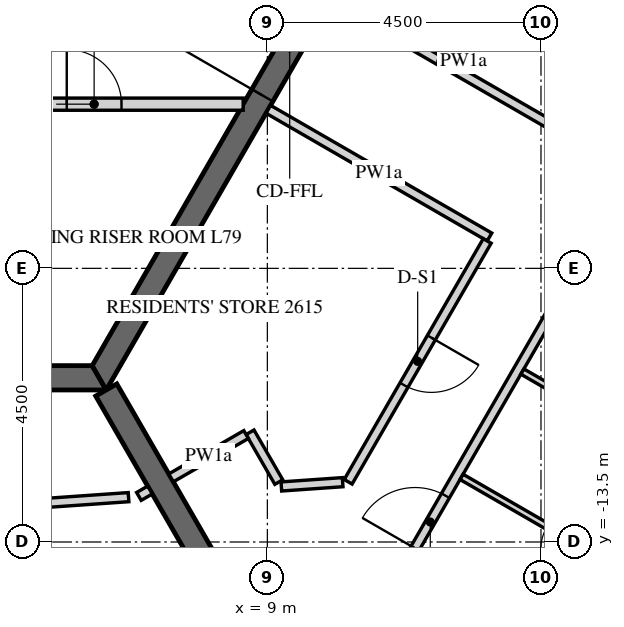
"""IFC4 building model, lengths in metres.
Left out: names, types, materials, properties, quantities, classifications, styles, units other than length and angle.
Written with IfcOpenShell. Run it as: python <this file> out.ifc"""

import sys

from ifc_helpers import new_model, si_unit, direction, frame, frame_2d, origin, place, context, subcontext, project, spatial, polyline, rectangle, outline, extrude, element, fill, save


model = new_model("IFC4")
c1 = context("Model", 3, precision=1e-05, world=origin(), true_north=direction((0.0, 1.0)))
c2 = subcontext(c1, "Body", "Model", "MODEL_VIEW")
j1 = project(units=[si_unit("LENGTHUNIT", "METRE"), si_unit("PLANEANGLEUNIT", "RADIAN")], contexts=[c1])
p1 = place(None, origin())
s1 = spatial("IfcSite", under=j1, at=p1, CompositionType="ELEMENT")
p2 = place(p1, origin())
s2 = spatial("IfcBuilding", under=s1, at=p2, CompositionType="ELEMENT")
p3 = place(p2, frame((0.0, 0.0, 326.4)))
s3 = spatial("IfcBuildingStorey", under=s2, at=p3, CompositionType="ELEMENT", Elevation=326.4)
p4 = place(p3, frame((-6.235, -10.8, -0.15), z_axis=(0.0, 0.0, 1.0), x_axis=(1.0, 0.0, 0.0)))
e1 = element("IfcWall", 1, at=p4, inside=s3, PredefinedType="SHEAR", context=c2, shape_type="SweptSolid", body=[
    extrude(outline(polyline([(-0.115, -0.2), (12.586, -0.2), (12.355, 0.2), (0.115, 0.2), (-0.115, -0.2)])), origin(), (0.0, 0.0, 1.0), 3.9),
])
p5 = place(p3, frame((6.235, -10.8, -0.15), z_axis=(0.0, 0.0, 1.0), x_axis=(0.499996419489, 0.866027470984, 0.0)))
e2 = element("IfcWall", 2, at=p5, inside=s3, PredefinedType="SHEAR", context=c2, shape_type="SweptSolid", body=[
    extrude(outline(polyline([(-0.115, -0.2), (12.586, -0.2), (12.355, 0.2), (0.115, 0.2), (-0.115, -0.2)])), origin(), (0.0, 0.0, 1.0), 3.9),
])
p6 = place(p5, frame((5.364, 0.0, 0.15)))
e3 = element("IfcOpeningElement", 3, at=p6, cuts=e2, PredefinedType="OPENING", context=c2, shape_type="SweptSolid", body=[
    extrude(rectangle(XDim=1.8, YDim=2.4, at=frame_2d((0.9, 1.2))), frame((0.0, 0.21, 0.0), z_axis=(0.0, -1.0, 0.0), x_axis=(1.0, 0.0, 0.0)), (0.0, 0.0, 1.0), 0.42),
])
p7 = place(p3, frame((6.351, -11.0, -0.15), z_axis=(0.0, 0.0, 1.0), x_axis=(0.499998894578, -0.866026041999, 0.0)))
e4 = element("IfcWall", 4, at=p7, inside=s3, PredefinedType="SHEAR", context=c2, shape_type="SweptSolid", body=[
    extrude(rectangle(XDim=15.544, YDim=0.4, at=frame_2d((7.772, 0.0))), origin(), (0.0, 0.0, 1.0), 3.9),
])
p8 = place(p7, frame((6.872, 0.0, 0.15)))
e5 = element("IfcOpeningElement", 5, at=p8, cuts=e4, PredefinedType="OPENING", context=c2, shape_type="SweptSolid", body=[
    extrude(rectangle(XDim=1.8, YDim=2.4, at=frame_2d((0.9, 1.2))), frame((0.0, 0.21, 0.0), z_axis=(0.0, -1.0, 0.0), x_axis=(1.0, 0.0, 0.0)), (0.0, 0.0, 1.0), 0.42),
])
p9 = place(p3, frame((3.7, -6.3, 0.0), z_axis=(0.0, 0.0, 1.0), x_axis=(1.0, 0.0, 0.0)))
e6 = element("IfcWall", 6, at=p9, inside=s3, PredefinedType="PARTITIONING", context=c2, shape_type="SweptSolid", body=[
    extrude(rectangle(XDim=4.903, YDim=0.2, at=frame_2d((2.451, 0.0))), origin(), (0.0, 0.0, 1.0), 3.65),
])
p10 = place(p9, frame((2.001, 0.0, 0.0)))
e7 = element("IfcOpeningElement", 7, at=p10, cuts=e6, PredefinedType="OPENING", context=c2, shape_type="SweptSolid", body=[
    extrude(rectangle(XDim=0.9, YDim=2.1, at=frame_2d((0.45, 1.05))), frame((0.0, 0.11, 0.0), z_axis=(0.0, -1.0, 0.0), x_axis=(1.0, 0.0, 0.0)), (0.0, 0.0, 1.0), 0.22),
])
p11 = place(p3, frame((7.07, -12.646, 0.0), z_axis=(0.0, 0.0, 1.0), x_axis=(-0.866378867349, -0.499387282788, 0.0)))
e8 = element("IfcWall", 8, at=p11, inside=s3, PredefinedType="PARTITIONING", context=c2, shape_type="SweptSolid", body=[
    extrude(rectangle(XDim=0.21, YDim=0.15, at=frame_2d((0.105, 0.0))), origin(), (0.0, 0.0, 1.0), 2.838),
])
p12 = place(p3, frame((6.717, -12.762, 0.0), z_axis=(0.0, 0.0, 1.0), x_axis=(-0.99756375843, -0.069760646978, 0.0)))
e9 = element("IfcWall", 9, at=p12, inside=s3, PredefinedType="PARTITIONING", context=c2, shape_type="SweptSolid", body=[
    extrude(rectangle(XDim=16.284, YDim=0.15, at=frame_2d((8.142, 0.0))), origin(), (0.0, 0.0, 1.0), 2.838),
])
p13 = place(p12, frame((7.692, 0.0, 0.0)))
e10 = element("IfcOpeningElement", 10, at=p13, cuts=e9, PredefinedType="OPENING", context=c2, shape_type="SweptSolid", body=[
    extrude(rectangle(XDim=0.9, YDim=2.1, at=frame_2d((0.45, 1.05))), frame((0.0, 0.085, 0.0), z_axis=(0.0, -1.0, 0.0), x_axis=(1.0, 0.0, 0.0)), (0.0, 0.0, 1.0), 0.17),
])
p14 = place(p3, frame((11.229, -13.951, 0.0), z_axis=(0.0, 0.0, 1.0), x_axis=(0.499997948852, 0.866026588012, 0.0)))
e11 = element("IfcWall", 11, at=p14, inside=s3, PredefinedType="PARTITIONING", context=c2, shape_type="SweptSolid", body=[
    extrude(rectangle(XDim=14.677, YDim=0.15, at=frame_2d((7.339, 0.0))), origin(), (0.0, 0.0, 1.0), 2.838),
])
p15 = place(p14, frame((0.4, 0.0, 0.0)))
e12 = element("IfcOpeningElement", 12, at=p15, cuts=e11, PredefinedType="OPENING", context=c2, shape_type="SweptSolid", body=[
    extrude(rectangle(XDim=1.0, YDim=2.1, at=frame_2d((0.5, 1.05))), frame((0.0, 0.085, 0.0), z_axis=(0.0, -1.0, 0.0), x_axis=(1.0, 0.0, 0.0)), (0.0, 0.0, 1.0), 0.17),
])
p16 = place(p14, frame((13.527, 0.0, 0.0)))
e13 = element("IfcOpeningElement", 13, at=p16, cuts=e11, PredefinedType="OPENING", context=c2, shape_type="SweptSolid", body=[
    extrude(rectangle(XDim=1.0, YDim=2.1, at=frame_2d((0.5, 1.05))), frame((0.0, 0.085, 0.0), z_axis=(0.0, -1.0, 0.0), x_axis=(1.0, 0.0, 0.0)), (0.0, 0.0, 1.0), 0.17),
])
p17 = place(p3, frame((9.016, -6.384, 0.0), z_axis=(0.0, 0.0, 1.0), x_axis=(0.866023935413, -0.500002543286, 0.0)))
e14 = element("IfcWall", 14, at=p17, inside=s3, PredefinedType="PARTITIONING", context=c2, shape_type="SweptSolid", body=[
    extrude(rectangle(XDim=4.2, YDim=0.15, at=frame_2d((2.1, 0.0))), origin(), (0.0, 0.0, 1.0), 2.838),
])
p18 = place(p3, frame((12.615, -8.549, 0.0), z_axis=(0.0, 0.0, 1.0), x_axis=(-0.499985850067, -0.866033573098, 0.0)))
e15 = element("IfcWall", 15, at=p18, inside=s3, PredefinedType="PARTITIONING", context=c2, shape_type="SweptSolid", body=[
    extrude(rectangle(XDim=4.573, YDim=0.15, at=frame_2d((2.287, 0.0))), origin(), (0.0, 0.0, 1.0), 2.838),
])
p19 = place(p18, frame((1.837, 0.0, 0.0)))
e16 = element("IfcOpeningElement", 16, at=p19, cuts=e15, PredefinedType="OPENING", context=c2, shape_type="SweptSolid", body=[
    extrude(rectangle(XDim=0.9, YDim=2.1, at=frame_2d((0.45, 1.05))), frame((0.0, 0.085, 0.0), z_axis=(0.0, -1.0, 0.0), x_axis=(1.0, 0.0, 0.0)), (0.0, 0.0, 1.0), 0.17),
])
p20 = place(p3, frame((10.239, -12.516, 0.0), z_axis=(0.0, 0.0, 1.0), x_axis=(-0.997561825928, -0.069788275888, 0.0)))
e17 = element("IfcWall", 17, at=p20, inside=s3, PredefinedType="PARTITIONING", context=c2, shape_type="SweptSolid", body=[
    extrude(rectangle(XDim=1.011, YDim=0.15, at=frame_2d((0.505, 0.0))), origin(), (0.0, 0.0, 1.0), 2.838),
])
p21 = place(p3, frame((9.188, -12.515, 0.0), z_axis=(0.0, 0.0, 1.0), x_axis=(-0.499998034377, 0.866026538634, 0.0)))
e18 = element("IfcWall", 18, at=p21, inside=s3, PredefinedType="PARTITIONING", context=c2, shape_type="SweptSolid", body=[
    extrude(rectangle(XDim=0.946, YDim=0.15, at=frame_2d((0.473, 0.0))), origin(), (0.0, 0.0, 1.0), 2.838),
])
p22 = place(p3, frame((8.65, -11.733, 0.0), z_axis=(0.0, 0.0, 1.0), x_axis=(-0.866062911188, -0.499935029643, 0.0)))
e19 = element("IfcWall", 19, at=p22, inside=s3, PredefinedType="PARTITIONING", context=c2, shape_type="SweptSolid", body=[
    extrude(rectangle(XDim=1.425, YDim=0.15, at=frame_2d((0.712, 0.0))), origin(), (0.0, 0.0, 1.0), 2.838),
])
p23 = place(p3, frame((13.638, -6.628, 0.0), z_axis=(0.0, 0.0, 1.0), x_axis=(-0.866034795751, 0.499983732284, 0.0)))
e20 = element("IfcWall", 20, at=p23, inside=s3, PredefinedType="PARTITIONING", context=c2, shape_type="SweptSolid", body=[
    extrude(rectangle(XDim=4.125, YDim=0.15, at=frame_2d((2.062, 0.0))), origin(), (0.0, 0.0, 1.0), 2.838),
])
p24 = place(p3, frame((13.194, -10.697, 0.0), z_axis=(0.0, 0.0, 1.0), x_axis=(0.866019999656, -0.500009360108, 0.0)))
e21 = element("IfcWall", 21, at=p24, inside=s3, PredefinedType="PARTITIONING", context=c2, shape_type="SweptSolid", body=[
    extrude(rectangle(XDim=4.125, YDim=0.1, at=frame_2d((2.062, 0.0))), origin(), (0.0, 0.0, 1.0), 2.838),
])
p25 = place(p3, frame((15.766, -14.492, 0.0), z_axis=(0.0, 0.0, 1.0), x_axis=(-0.866019999656, 0.500009360108, 0.0)))
e22 = element("IfcWall", 22, at=p25, inside=s3, PredefinedType="PARTITIONING", context=c2, shape_type="SweptSolid", body=[
    extrude(rectangle(XDim=4.125, YDim=0.1, at=frame_2d((2.062, 0.0))), origin(), (0.0, 0.0, 1.0), 2.838),
])
p26 = place(p25, frame((1.7, 0.0, 0.0)))
e23 = element("IfcOpeningElement", 23, at=p26, cuts=e22, PredefinedType="OPENING", context=c2, shape_type="SweptSolid", body=[
    extrude(rectangle(XDim=0.8, YDim=2.1, at=frame_2d((0.4, 1.05))), frame((0.0, 0.06, 0.0), z_axis=(0.0, -1.0, 0.0), x_axis=(1.0, 0.0, 0.0)), (0.0, 0.0, 1.0), 0.12),
])
p27 = place(p6, origin())
e24 = element("IfcDoor", 24, at=p27, inside=s3, OperationType="DOUBLE_DOOR_SINGLE_SWING", PredefinedType="DOOR", context=c2, shape_type="SweptSolid", body=[
    extrude(rectangle(XDim=1.8, YDim=2.4, at=frame_2d((0.9, 1.2))), frame((0.0, 0.025, 0.0), z_axis=(0.0, -1.0, 0.0), x_axis=(1.0, 0.0, 0.0)), (0.0, 0.0, 1.0), 0.05),
])
fill(e3, e24)
p28 = place(p10, origin())
e25 = element("IfcDoor", 25, at=p28, inside=s3, OperationType="SINGLE_SWING_LEFT", PredefinedType="DOOR", context=c2, shape_type="SweptSolid", body=[
    extrude(rectangle(XDim=0.9, YDim=2.1, at=frame_2d((0.45, 1.05))), frame((0.0, 0.025, 0.0), z_axis=(0.0, -1.0, 0.0), x_axis=(1.0, 0.0, 0.0)), (0.0, 0.0, 1.0), 0.05),
])
fill(e7, e25)
p29 = place(p15, origin())
e26 = element("IfcDoor", 26, at=p29, inside=s3, OperationType="SINGLE_SWING_RIGHT", PredefinedType="DOOR", context=c2, shape_type="SweptSolid", body=[
    extrude(rectangle(XDim=1.0, YDim=2.1, at=frame_2d((0.5, 1.05))), frame((0.0, 0.025, 0.0), z_axis=(0.0, -1.0, 0.0), x_axis=(1.0, 0.0, 0.0)), (0.0, 0.0, 1.0), 0.05),
])
fill(e12, e26)
p30 = place(p19, origin())
e27 = element("IfcDoor", 27, at=p30, inside=s3, OperationType="SINGLE_SWING_LEFT", PredefinedType="DOOR", context=c2, shape_type="SweptSolid", body=[
    extrude(rectangle(XDim=0.9, YDim=2.1, at=frame_2d((0.45, 1.05))), frame((0.0, 0.025, 0.0), z_axis=(0.0, -1.0, 0.0), x_axis=(1.0, 0.0, 0.0)), (0.0, 0.0, 1.0), 0.05),
])
fill(e16, e27)
save(model, sys.argv[1])
